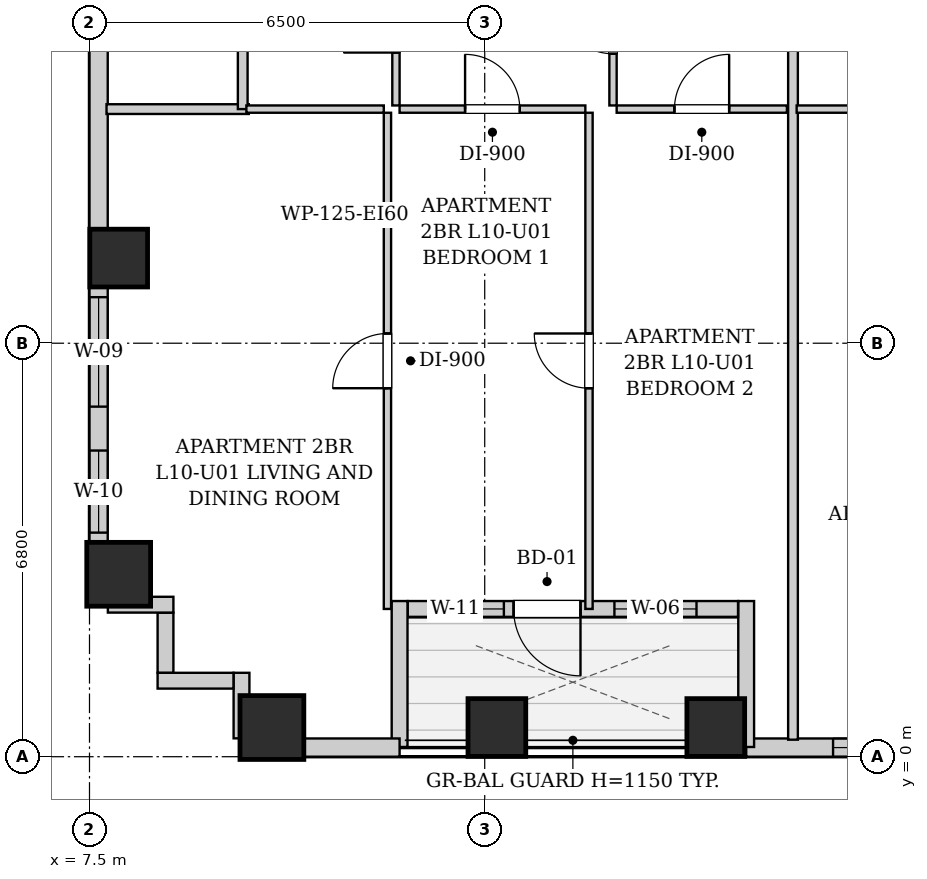
"""IFC4 building model, lengths in metres.
Left out: names, types, materials, properties, quantities, classifications, styles, units other than length and angle.
Written with IfcOpenShell. Run it as: python <this file> out.ifc"""

import sys

from ifc_helpers import new_model, si_unit, direction, frame, frame_2d, origin, origin_2d, place, context, subcontext, project, spatial, rectangle, extrude, element, fill, save


model = new_model("IFC4")
c1 = context("Model", 3, precision=1e-05, world=origin(), true_north=direction((0.0, 1.0)))
c2 = subcontext(c1, "Body", "Model", "MODEL_VIEW")
j1 = project(units=[si_unit("LENGTHUNIT", "METRE"), si_unit("PLANEANGLEUNIT", "RADIAN")], contexts=[c1])
p1 = place(None, origin())
s1 = spatial("IfcSite", under=j1, at=p1, CompositionType="ELEMENT")
p2 = place(p1, origin())
s2 = spatial("IfcBuilding", under=s1, at=p2, CompositionType="ELEMENT")
p3 = place(p2, frame((0.0, 0.0, 41.8)))
s3 = spatial("IfcBuildingStorey", under=s2, at=p3, CompositionType="ELEMENT", Elevation=41.8)
p4 = place(p3, frame((10.5, 0.48, 0.0), z_axis=(0.0, 0.0, 1.0), x_axis=(1.0, 0.0, 0.0)))
e1 = element("IfcColumn", 1, at=p4, inside=s3, PredefinedType="COLUMN", context=c2, shape_type="SweptSolid", body=[
    extrude(rectangle(XDim=1.05, YDim=1.05, at=origin_2d()), origin(), (0.0, 0.0, 1.0), 3.2),
])
for number, where, z_axis, x_axis in (
    (2, (14.2, 0.48, 0.0), (0.0, 0.0, 1.0), (1.0, 0.0, 0.0)),
    (3, (17.8, 0.48, 0.0), (0.0, 0.0, 1.0), (1.0, 0.0, 0.0)),
):
    element("IfcColumn", number, at=place(p3, frame(where, z_axis=z_axis, x_axis=x_axis)), inside=s3, PredefinedType="COLUMN", context=c2, shape_type="SweptSolid", body=[
        extrude(rectangle(XDim=0.95, YDim=0.95, at=origin_2d()), origin(), (0.0, 0.0, 1.0), 3.2),
    ])
p5 = place(p3, frame((7.98, 3.0, 0.0), z_axis=(0.0, 0.0, 1.0), x_axis=(1.0, 0.0, 0.0)))
e4 = element("IfcColumn", 4, at=p5, inside=s3, PredefinedType="COLUMN", context=c2, shape_type="SweptSolid", body=[
    extrude(rectangle(XDim=1.05, YDim=1.05, at=origin_2d()), origin(), (0.0, 0.0, 1.0), 3.2),
])
p6 = place(p3, frame((7.98, 8.2, 0.0), z_axis=(0.0, 0.0, 1.0), x_axis=(1.0, 0.0, 0.0)))
e5 = element("IfcColumn", 5, at=p6, inside=s3, PredefinedType="COLUMN", context=c2, shape_type="SweptSolid", body=[
    extrude(rectangle(XDim=0.95, YDim=0.95, at=origin_2d()), origin(), (0.0, 0.0, 1.0), 3.2),
])
p7 = place(p3, frame((44.0, 0.15, 0.0), z_axis=(0.0, 0.0, 1.0), x_axis=(-1.0, 0.0, 0.0)))
e6 = element("IfcWall", 6, at=p7, inside=s3, PredefinedType="SOLIDWALL", context=c2, shape_type="SweptSolid", body=[
    extrude(rectangle(XDim=25.7, YDim=0.3, at=frame_2d((12.85, 0.0))), origin(), (0.0, 0.0, 1.0), 1.975),
])
p8 = place(p7, frame((22.471, 0.0, 0.55)))
e7 = element("IfcOpeningElement", 7, at=p8, cuts=e6, PredefinedType="OPENING", context=c2, shape_type="SweptSolid", body=[
    extrude(rectangle(XDim=1.8, YDim=1.2, at=frame_2d((0.9, 0.6))), frame((0.0, 0.16, 0.0), z_axis=(0.0, -1.0, 0.0), x_axis=(1.0, 0.0, 0.0)), (0.0, 0.0, 1.0), 0.32),
])
p9 = place(p7, frame((15.65, 0.0, 0.55)))
e8 = element("IfcOpeningElement", 8, at=p9, cuts=e6, PredefinedType="OPENING", context=c2, shape_type="SweptSolid", body=[
    extrude(rectangle(XDim=0.85, YDim=1.2, at=frame_2d((0.425, 0.6))), frame((0.0, 0.16, 0.0), z_axis=(0.0, -1.0, 0.0), x_axis=(1.0, 0.0, 0.0)), (0.0, 0.0, 1.0), 0.32),
])
p10 = place(p7, frame((12.777, 0.0, 0.55)))
e9 = element("IfcOpeningElement", 9, at=p10, cuts=e6, PredefinedType="OPENING", context=c2, shape_type="SweptSolid", body=[
    extrude(rectangle(XDim=1.8, YDim=1.2, at=frame_2d((0.9, 0.6))), frame((0.0, 0.16, 0.0), z_axis=(0.0, -1.0, 0.0), x_axis=(1.0, 0.0, 0.0)), (0.0, 0.0, 1.0), 0.32),
])
p11 = place(p7, frame((9.315, 0.0, 0.55)))
e10 = element("IfcOpeningElement", 10, at=p11, cuts=e6, PredefinedType="OPENING", context=c2, shape_type="SweptSolid", body=[
    extrude(rectangle(XDim=0.85, YDim=1.2, at=frame_2d((0.425, 0.6))), frame((0.0, 0.16, 0.0), z_axis=(0.0, -1.0, 0.0), x_axis=(1.0, 0.0, 0.0)), (0.0, 0.0, 1.0), 0.32),
])
p12 = place(p7, frame((6.435, 0.0, 0.55)))
e11 = element("IfcOpeningElement", 11, at=p12, cuts=e6, PredefinedType="OPENING", context=c2, shape_type="SweptSolid", body=[
    extrude(rectangle(XDim=1.8, YDim=1.2, at=frame_2d((0.9, 0.6))), frame((0.0, 0.16, 0.0), z_axis=(0.0, -1.0, 0.0), x_axis=(1.0, 0.0, 0.0)), (0.0, 0.0, 1.0), 0.32),
])
p13 = place(p7, frame((2.106, 0.0, 0.55)))
e12 = element("IfcOpeningElement", 12, at=p13, cuts=e6, PredefinedType="OPENING", context=c2, shape_type="SweptSolid", body=[
    extrude(rectangle(XDim=1.8, YDim=1.2, at=frame_2d((0.9, 0.6))), frame((0.0, 0.16, 0.0), z_axis=(0.0, -1.0, 0.0), x_axis=(1.0, 0.0, 0.0)), (0.0, 0.0, 1.0), 0.32),
])
p14 = place(p3, frame((18.3, 0.16, 0.0), z_axis=(0.0, 0.0, 1.0), x_axis=(0.0, 1.0, 0.0)))
e13 = element("IfcWall", 13, at=p14, inside=s3, PredefinedType="SOLIDWALL", context=c2, shape_type="SweptSolid", body=[
    extrude(rectangle(XDim=2.4, YDim=0.26, at=frame_2d((1.2, 0.0))), origin(), (0.0, 0.0, 1.0), 2.94),
])
p15 = place(p3, frame((18.166, 2.43, 0.0), z_axis=(0.0, 0.0, 1.0), x_axis=(-1.0, 0.0, 0.0)))
e14 = element("IfcWall", 14, at=p15, inside=s3, PredefinedType="SOLIDWALL", context=c2, shape_type="SweptSolid", body=[
    extrude(rectangle(XDim=5.432, YDim=0.26, at=frame_2d((2.716, 0.0))), origin(), (0.0, 0.0, 1.0), 2.94),
])
p16 = place(p15, frame((2.591, 0.0, 0.0)))
e15 = element("IfcOpeningElement", 15, at=p16, cuts=e14, PredefinedType="OPENING", context=c2, shape_type="SweptSolid", body=[
    extrude(rectangle(XDim=1.1, YDim=2.0, at=frame_2d((0.55, 1.0))), frame((0.0, 0.14, 0.0), z_axis=(0.0, -1.0, 0.0), x_axis=(1.0, 0.0, 0.0)), (0.0, 0.0, 1.0), 0.28),
])
p17 = place(p15, frame((3.851, 0.0, 0.55)))
e16 = element("IfcOpeningElement", 16, at=p17, cuts=e14, PredefinedType="OPENING", context=c2, shape_type="SweptSolid", body=[
    extrude(rectangle(XDim=0.85, YDim=1.2, at=frame_2d((0.425, 0.6))), frame((0.0, 0.14, 0.0), z_axis=(0.0, -1.0, 0.0), x_axis=(1.0, 0.0, 0.0)), (0.0, 0.0, 1.0), 0.28),
])
p18 = place(p15, frame((0.683, 0.0, 0.85)))
e17 = element("IfcOpeningElement", 17, at=p18, cuts=e14, PredefinedType="OPENING", context=c2, shape_type="SweptSolid", body=[
    extrude(rectangle(XDim=1.35, YDim=1.65, at=frame_2d((0.675, 0.825))), frame((0.0, 0.14, 0.0), z_axis=(0.0, -1.0, 0.0), x_axis=(1.0, 0.0, 0.0)), (0.0, 0.0, 1.0), 0.28),
])
p19 = place(p3, frame((12.6, 2.56, 0.0), z_axis=(0.0, 0.0, 1.0), x_axis=(0.0, -1.0, 0.0)))
e18 = element("IfcWall", 18, at=p19, inside=s3, PredefinedType="SOLIDWALL", context=c2, shape_type="SweptSolid", body=[
    extrude(rectangle(XDim=2.4, YDim=0.26, at=frame_2d((1.2, 0.0))), origin(), (0.0, 0.0, 1.0), 2.94),
])
p20 = place(p3, frame((12.6, 0.15, 0.0), z_axis=(0.0, 0.0, 1.0), x_axis=(-1.0, 0.0, 0.0)))
e19 = element("IfcWall", 19, at=p20, inside=s3, PredefinedType="SOLIDWALL", context=c2, shape_type="SweptSolid", body=[
    extrude(rectangle(XDim=2.6, YDim=0.3, at=frame_2d((1.3, 0.0))), origin(), (0.0, 0.0, 1.0), 1.975),
])
p21 = place(p3, frame((7.65, 2.5, 0.0), z_axis=(0.0, 0.0, 1.0), x_axis=(0.0, 1.0, 0.0)))
e20 = element("IfcWall", 20, at=p21, inside=s3, PredefinedType="SOLIDWALL", context=c2, shape_type="SweptSolid", body=[
    extrude(rectangle(XDim=12.7, YDim=0.3, at=frame_2d((6.35, 0.0))), origin(), (0.0, 0.0, 1.0), 1.975),
])
p22 = place(p21, frame((3.257, 0.0, 0.55)))
e21 = element("IfcOpeningElement", 21, at=p22, cuts=e20, PredefinedType="OPENING", context=c2, shape_type="SweptSolid", body=[
    extrude(rectangle(XDim=1.8, YDim=1.2, at=frame_2d((0.9, 0.6))), frame((0.0, 0.16, 0.0), z_axis=(0.0, -1.0, 0.0), x_axis=(1.0, 0.0, 0.0)), (0.0, 0.0, 1.0), 0.32),
])
p23 = place(p21, frame((1.185, 0.0, 0.55)))
e22 = element("IfcOpeningElement", 22, at=p23, cuts=e20, PredefinedType="OPENING", context=c2, shape_type="SweptSolid", body=[
    extrude(rectangle(XDim=1.35, YDim=1.2, at=frame_2d((0.675, 0.6))), frame((0.0, 0.16, 0.0), z_axis=(0.0, -1.0, 0.0), x_axis=(1.0, 0.0, 0.0)), (0.0, 0.0, 1.0), 0.32),
])
p24 = place(p3, frame((10.0, 0.302, 0.0), z_axis=(0.0, 0.0, 1.0), x_axis=(0.0, 1.0, 0.0)))
e23 = element("IfcWall", 23, at=p24, inside=s3, PredefinedType="SOLIDWALL", context=c2, shape_type="SweptSolid", body=[
    extrude(rectangle(XDim=1.078, YDim=0.26, at=frame_2d((0.539, 0.0))), origin(), (0.0, 0.0, 1.0), 2.94),
])
p25 = place(p3, frame((9.868, 1.25, 0.0), z_axis=(0.0, 0.0, 1.0), x_axis=(-1.0, 0.0, 0.0)))
e24 = element("IfcWall", 24, at=p25, inside=s3, PredefinedType="SOLIDWALL", context=c2, shape_type="SweptSolid", body=[
    extrude(rectangle(XDim=1.248, YDim=0.26, at=frame_2d((0.624, 0.0))), origin(), (0.0, 0.0, 1.0), 2.94),
])
p26 = place(p3, frame((8.75, 1.382, 0.0), z_axis=(0.0, 0.0, 1.0), x_axis=(0.0, 1.0, 0.0)))
e25 = element("IfcWall", 25, at=p26, inside=s3, PredefinedType="SOLIDWALL", context=c2, shape_type="SweptSolid", body=[
    extrude(rectangle(XDim=0.986, YDim=0.26, at=frame_2d((0.493, 0.0))), origin(), (0.0, 0.0, 1.0), 2.94),
])
p27 = place(p3, frame((8.88, 2.5, 0.0), z_axis=(0.0, 0.0, 1.0), x_axis=(-1.0, 0.0, 0.0)))
e26 = element("IfcWall", 26, at=p27, inside=s3, PredefinedType="SOLIDWALL", context=c2, shape_type="SweptSolid", body=[
    extrude(rectangle(XDim=1.078, YDim=0.26, at=frame_2d((0.539, 0.0))), origin(), (0.0, 0.0, 1.0), 2.94),
])
p28 = place(p3, frame((7.78, 10.65, 0.0), z_axis=(0.0, 0.0, 1.0), x_axis=(1.0, 0.0, 0.0)))
e27 = element("IfcWall", 27, at=p28, inside=s3, PredefinedType="PARTITIONING", context=c2, shape_type="SweptSolid", body=[
    extrude(rectangle(XDim=2.34, YDim=0.16, at=frame_2d((1.17, 0.0))), origin(), (0.0, 0.0, 1.0), 2.94),
])
p29 = place(p3, frame((10.02, 10.65, 0.0), z_axis=(0.0, 0.0, 1.0), x_axis=(0.0, 1.0, 0.0)))
e28 = element("IfcWall", 28, at=p29, inside=s3, PredefinedType="PARTITIONING", context=c2, shape_type="SweptSolid", body=[
    extrude(rectangle(XDim=2.66, YDim=0.16, at=frame_2d((1.33, 0.0))), origin(), (0.0, 0.0, 1.0), 2.94),
])
p30 = place(p3, frame((12.54, 10.71, 0.0), z_axis=(0.0, 0.0, 1.0), x_axis=(0.0, 1.0, 0.0)))
e29 = element("IfcWall", 29, at=p30, inside=s3, PredefinedType="PARTITIONING", context=c2, shape_type="SweptSolid", body=[
    extrude(rectangle(XDim=2.6, YDim=0.12, at=frame_2d((1.3, 0.0))), origin(), (0.0, 0.0, 1.0), 2.94),
])
p31 = place(p30, frame((0.87, 0.0, 0.0)))
e30 = element("IfcOpeningElement", 30, at=p31, cuts=e29, PredefinedType="OPENING", context=c2, shape_type="SweptSolid", body=[
    extrude(rectangle(XDim=0.86, YDim=2.05, at=frame_2d((0.43, 1.025))), frame((0.0, 0.07, 0.0), z_axis=(0.0, -1.0, 0.0), x_axis=(1.0, 0.0, 0.0)), (0.0, 0.0, 1.0), 0.14),
])
p32 = place(p3, frame((10.08, 10.65, 0.0), z_axis=(0.0, 0.0, 1.0), x_axis=(1.0, 0.0, 0.0)))
e31 = element("IfcWall", 31, at=p32, inside=s3, PredefinedType="PARTITIONING", context=c2, shape_type="SweptSolid", body=[
    extrude(rectangle(XDim=2.26, YDim=0.12, at=frame_2d((1.13, 0.0))), origin(), (0.0, 0.0, 1.0), 2.94),
])
p33 = place(p3, frame((16.11, 10.71, 0.0), z_axis=(0.0, 0.0, 1.0), x_axis=(0.0, 1.0, 0.0)))
e32 = element("IfcWall", 32, at=p33, inside=s3, PredefinedType="PARTITIONING", context=c2, shape_type="SweptSolid", body=[
    extrude(rectangle(XDim=2.6, YDim=0.12, at=frame_2d((1.3, 0.0))), origin(), (0.0, 0.0, 1.0), 2.94),
])
p34 = place(p33, frame((0.85, 0.0, 0.0)))
e33 = element("IfcOpeningElement", 33, at=p34, cuts=e32, PredefinedType="OPENING", context=c2, shape_type="SweptSolid", body=[
    extrude(rectangle(XDim=0.9, YDim=2.05, at=frame_2d((0.45, 1.025))), frame((0.0, 0.07, 0.0), z_axis=(0.0, -1.0, 0.0), x_axis=(1.0, 0.0, 0.0)), (0.0, 0.0, 1.0), 0.14),
])
p35 = place(p3, frame((12.6, 10.65, 0.0), z_axis=(0.0, 0.0, 1.0), x_axis=(1.0, 0.0, 0.0)))
e34 = element("IfcWall", 34, at=p35, inside=s3, PredefinedType="PARTITIONING", context=c2, shape_type="SweptSolid", body=[
    extrude(rectangle(XDim=3.055, YDim=0.12, at=frame_2d((1.527, 0.0))), origin(), (0.0, 0.0, 1.0), 2.94),
])
p36 = place(p35, frame((1.077, 0.0, 0.0)))
e35 = element("IfcOpeningElement", 35, at=p36, cuts=e34, PredefinedType="OPENING", context=c2, shape_type="SweptSolid", body=[
    extrude(rectangle(XDim=0.9, YDim=2.05, at=frame_2d((0.45, 1.025))), frame((0.0, 0.07, 0.0), z_axis=(0.0, -1.0, 0.0), x_axis=(1.0, 0.0, 0.0)), (0.0, 0.0, 1.0), 0.14),
])
p37 = place(p3, frame((16.17, 10.65, 0.0), z_axis=(0.0, 0.0, 1.0), x_axis=(1.0, 0.0, 0.0)))
e36 = element("IfcWall", 36, at=p37, inside=s3, PredefinedType="PARTITIONING", context=c2, shape_type="SweptSolid", body=[
    extrude(rectangle(XDim=2.8, YDim=0.12, at=frame_2d((1.4, 0.0))), origin(), (0.0, 0.0, 1.0), 2.94),
])
p38 = place(p37, frame((0.95, 0.0, 0.0)))
e37 = element("IfcOpeningElement", 37, at=p38, cuts=e36, PredefinedType="OPENING", context=c2, shape_type="SweptSolid", body=[
    extrude(rectangle(XDim=0.9, YDim=2.05, at=frame_2d((0.45, 1.025))), frame((0.0, 0.07, 0.0), z_axis=(0.0, -1.0, 0.0), x_axis=(1.0, 0.0, 0.0)), (0.0, 0.0, 1.0), 0.14),
])
p39 = place(p3, frame((12.4, 2.43, 0.0), z_axis=(0.0, 0.0, 1.0), x_axis=(0.0, 1.0, 0.0)))
e38 = element("IfcWall", 38, at=p39, inside=s3, PredefinedType="PARTITIONING", context=c2, shape_type="SweptSolid", body=[
    extrude(rectangle(XDim=8.16, YDim=0.12, at=frame_2d((4.08, 0.0))), origin(), (0.0, 0.0, 1.0), 2.94),
])
p40 = place(p39, frame((3.63, 0.0, 0.0)))
e39 = element("IfcOpeningElement", 39, at=p40, cuts=e38, PredefinedType="OPENING", context=c2, shape_type="SweptSolid", body=[
    extrude(rectangle(XDim=0.9, YDim=2.05, at=frame_2d((0.45, 1.025))), frame((0.0, 0.07, 0.0), z_axis=(0.0, -1.0, 0.0), x_axis=(1.0, 0.0, 0.0)), (0.0, 0.0, 1.0), 0.14),
])
p41 = place(p3, frame((15.715, 2.43, 0.0), z_axis=(0.0, 0.0, 1.0), x_axis=(0.0, 1.0, 0.0)))
e40 = element("IfcWall", 40, at=p41, inside=s3, PredefinedType="PARTITIONING", context=c2, shape_type="SweptSolid", body=[
    extrude(rectangle(XDim=8.16, YDim=0.12, at=frame_2d((4.08, 0.0))), origin(), (0.0, 0.0, 1.0), 2.94),
])
p42 = place(p41, frame((3.63, 0.0, 0.0)))
e41 = element("IfcOpeningElement", 41, at=p42, cuts=e40, PredefinedType="OPENING", context=c2, shape_type="SweptSolid", body=[
    extrude(rectangle(XDim=0.9, YDim=2.05, at=frame_2d((0.45, 1.025))), frame((0.0, 0.07, 0.0), z_axis=(0.0, -1.0, 0.0), x_axis=(1.0, 0.0, 0.0)), (0.0, 0.0, 1.0), 0.14),
])
p43 = place(p3, frame((19.07, 0.28, 0.0), z_axis=(0.0, 0.0, 1.0), x_axis=(0.0, 1.0, 0.0)))
e42 = element("IfcWall", 42, at=p43, inside=s3, PredefinedType="PARTITIONING", context=c2, shape_type="SweptSolid", body=[
    extrude(rectangle(XDim=13.03, YDim=0.16, at=frame_2d((6.515, 0.0))), origin(), (0.0, 0.0, 1.0), 2.94),
])
p44 = place(p3, frame((19.13, 10.65, 0.0), z_axis=(0.0, 0.0, 1.0), x_axis=(1.0, 0.0, 0.0)))
e43 = element("IfcWall", 43, at=p44, inside=s3, PredefinedType="PARTITIONING", context=c2, shape_type="SweptSolid", body=[
    extrude(rectangle(XDim=2.4, YDim=0.12, at=frame_2d((1.2, 0.0))), origin(), (0.0, 0.0, 1.0), 2.94),
])
p45 = place(p31, origin())
e44 = element("IfcDoor", 44, at=p45, inside=s3, OperationType="SINGLE_SWING_LEFT", PredefinedType="DOOR", context=c2, shape_type="SweptSolid", body=[
    extrude(rectangle(XDim=0.86, YDim=2.05, at=frame_2d((0.43, 1.025))), frame((0.0, 0.025, 0.0), z_axis=(0.0, -1.0, 0.0), x_axis=(1.0, 0.0, 0.0)), (0.0, 0.0, 1.0), 0.05),
])
fill(e30, e44)
p46 = place(p34, origin())
e45 = element("IfcDoor", 45, at=p46, inside=s3, OperationType="SINGLE_SWING_RIGHT", PredefinedType="DOOR", context=c2, shape_type="SweptSolid", body=[
    extrude(rectangle(XDim=0.9, YDim=2.05, at=frame_2d((0.45, 1.025))), frame((0.0, 0.025, 0.0), z_axis=(0.0, -1.0, 0.0), x_axis=(1.0, 0.0, 0.0)), (0.0, 0.0, 1.0), 0.05),
])
fill(e33, e45)
p47 = place(p36, origin())
e46 = element("IfcDoor", 46, at=p47, inside=s3, OperationType="SINGLE_SWING_LEFT", PredefinedType="DOOR", context=c2, shape_type="SweptSolid", body=[
    extrude(rectangle(XDim=0.9, YDim=2.05, at=frame_2d((0.45, 1.025))), frame((0.0, 0.025, 0.0), z_axis=(0.0, -1.0, 0.0), x_axis=(1.0, 0.0, 0.0)), (0.0, 0.0, 1.0), 0.05),
])
fill(e35, e46)
p48 = place(p38, origin())
e47 = element("IfcDoor", 47, at=p48, inside=s3, OperationType="SINGLE_SWING_RIGHT", PredefinedType="DOOR", context=c2, shape_type="SweptSolid", body=[
    extrude(rectangle(XDim=0.9, YDim=2.05, at=frame_2d((0.45, 1.025))), frame((0.0, 0.025, 0.0), z_axis=(0.0, -1.0, 0.0), x_axis=(1.0, 0.0, 0.0)), (0.0, 0.0, 1.0), 0.05),
])
fill(e37, e47)
p49 = place(p40, origin())
e48 = element("IfcDoor", 48, at=p49, inside=s3, OperationType="SINGLE_SWING_LEFT", PredefinedType="DOOR", context=c2, shape_type="SweptSolid", body=[
    extrude(rectangle(XDim=0.9, YDim=2.05, at=frame_2d((0.45, 1.025))), frame((0.0, 0.025, 0.0), z_axis=(0.0, -1.0, 0.0), x_axis=(1.0, 0.0, 0.0)), (0.0, 0.0, 1.0), 0.05),
])
fill(e39, e48)
p50 = place(p42, origin())
e49 = element("IfcDoor", 49, at=p50, inside=s3, OperationType="SINGLE_SWING_RIGHT", PredefinedType="DOOR", context=c2, shape_type="SweptSolid", body=[
    extrude(rectangle(XDim=0.9, YDim=2.05, at=frame_2d((0.45, 1.025))), frame((0.0, 0.025, 0.0), z_axis=(0.0, -1.0, 0.0), x_axis=(1.0, 0.0, 0.0)), (0.0, 0.0, 1.0), 0.05),
])
fill(e41, e49)
p51 = place(p16, origin())
e50 = element("IfcDoor", 50, at=p51, inside=s3, OperationType="SINGLE_SWING_LEFT", PredefinedType="DOOR", context=c2, shape_type="SweptSolid", body=[
    extrude(rectangle(XDim=1.1, YDim=2.0, at=frame_2d((0.55, 1.0))), frame((0.0, 0.025, 0.0), z_axis=(0.0, -1.0, 0.0), x_axis=(1.0, 0.0, 0.0)), (0.0, 0.0, 1.0), 0.05),
])
fill(e15, e50)
p52 = place(p22, origin())
e51 = element("IfcWindow", 51, at=p52, inside=s3, PartitioningType="DOUBLE_PANEL_VERTICAL", PredefinedType="WINDOW", context=c2, shape_type="SweptSolid", body=[
    extrude(rectangle(XDim=1.8, YDim=1.2, at=frame_2d((0.9, 0.6))), frame((0.0, 0.03, 0.0), z_axis=(0.0, -1.0, 0.0), x_axis=(1.0, 0.0, 0.0)), (0.0, 0.0, 1.0), 0.06),
])
fill(e21, e51)
p53 = place(p23, origin())
e52 = element("IfcWindow", 52, at=p53, inside=s3, PartitioningType="SINGLE_PANEL", PredefinedType="WINDOW", context=c2, shape_type="SweptSolid", body=[
    extrude(rectangle(XDim=1.35, YDim=1.2, at=frame_2d((0.675, 0.6))), frame((0.0, 0.03, 0.0), z_axis=(0.0, -1.0, 0.0), x_axis=(1.0, 0.0, 0.0)), (0.0, 0.0, 1.0), 0.06),
])
fill(e22, e52)
p54 = place(p17, origin())
e53 = element("IfcWindow", 53, at=p54, inside=s3, PartitioningType="SINGLE_PANEL", PredefinedType="WINDOW", context=c2, shape_type="SweptSolid", body=[
    extrude(rectangle(XDim=0.85, YDim=1.2, at=frame_2d((0.425, 0.6))), frame((0.0, 0.03, 0.0), z_axis=(0.0, -1.0, 0.0), x_axis=(1.0, 0.0, 0.0)), (0.0, 0.0, 1.0), 0.06),
])
fill(e16, e53)
p55 = place(p18, origin())
e54 = element("IfcWindow", 54, at=p55, inside=s3, PartitioningType="SINGLE_PANEL", PredefinedType="WINDOW", context=c2, shape_type="SweptSolid", body=[
    extrude(rectangle(XDim=1.35, YDim=1.65, at=frame_2d((0.675, 0.825))), frame((0.0, 0.03, 0.0), z_axis=(0.0, -1.0, 0.0), x_axis=(1.0, 0.0, 0.0)), (0.0, 0.0, 1.0), 0.06),
])
fill(e17, e54)
p56 = place(p8, origin())
e55 = element("IfcWindow", 55, at=p56, inside=s3, PartitioningType="DOUBLE_PANEL_VERTICAL", PredefinedType="WINDOW", context=c2, shape_type="SweptSolid", body=[
    extrude(rectangle(XDim=1.8, YDim=1.2, at=frame_2d((0.9, 0.6))), frame((0.0, 0.03, 0.0), z_axis=(0.0, -1.0, 0.0), x_axis=(1.0, 0.0, 0.0)), (0.0, 0.0, 1.0), 0.06),
])
fill(e7, e55)
save(model, sys.argv[1])
